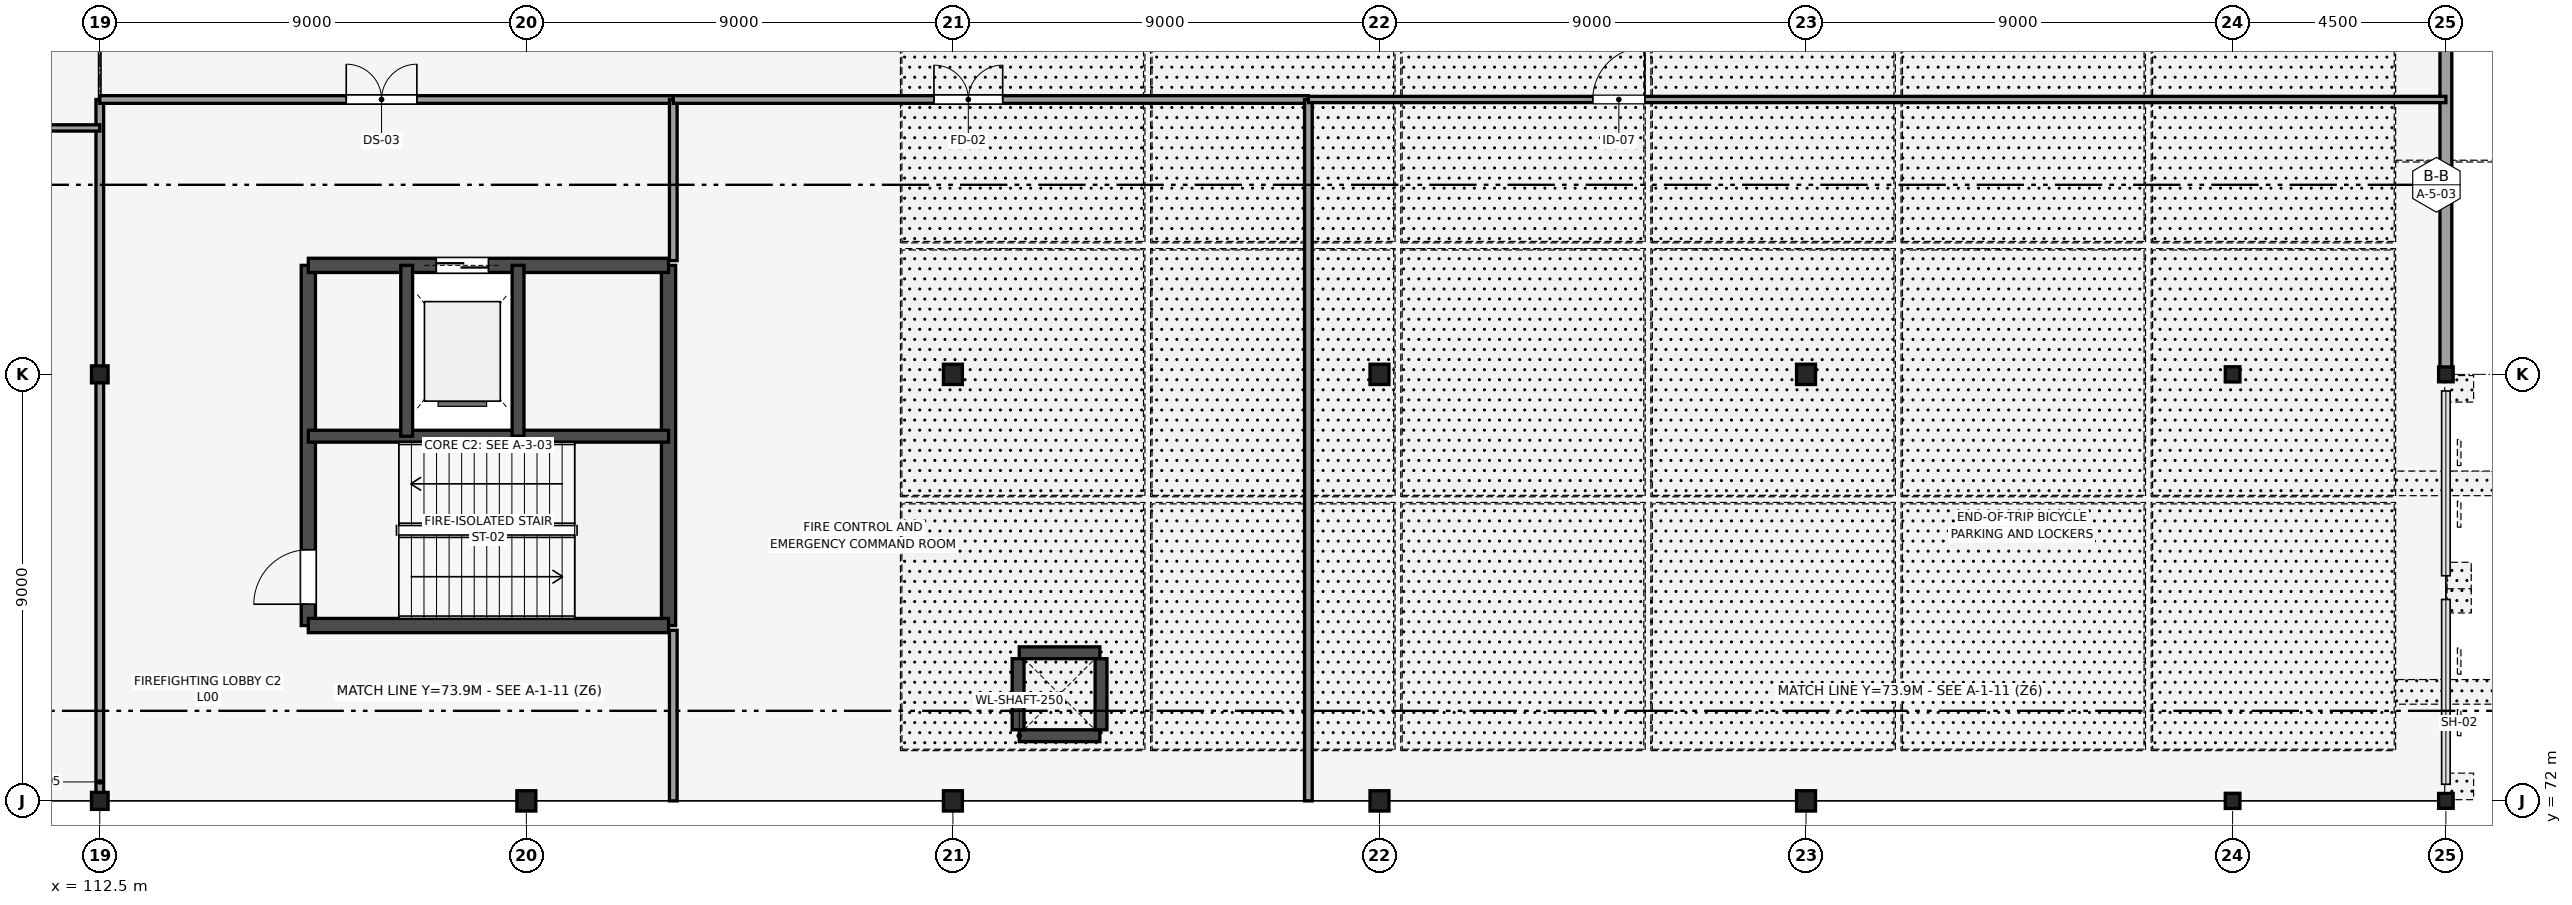
"""IFC4 building model, lengths in metres.
Left out: names, types, materials, properties, quantities, classifications, styles, units other than length and angle.
Written with IfcOpenShell. Run it as: python <this file> out.ifc"""

import sys

from ifc_helpers import new_model, si_unit, direction, frame, frame_2d, origin, origin_2d, place, context, subcontext, project, spatial, rectangle, i_section, extrude, element, fill, save


model = new_model("IFC4")
c1 = context("Model", 3, precision=1e-05, world=origin(), true_north=direction((0.0, 1.0)))
c2 = subcontext(c1, "Body", "Model", "MODEL_VIEW")
j1 = project(units=[si_unit("LENGTHUNIT", "METRE"), si_unit("PLANEANGLEUNIT", "RADIAN")], contexts=[c1])
p1 = place(None, origin())
s1 = spatial("IfcSite", under=j1, at=p1, CompositionType="ELEMENT")
p2 = place(p1, origin())
s2 = spatial("IfcBuilding", under=s1, at=p2, CompositionType="ELEMENT")
p3 = place(p2, origin())
s3 = spatial("IfcBuildingStorey", under=s2, at=p3, CompositionType="ELEMENT", Elevation=0.0)
for number, where, z_axis, x_axis in (
    (1, (112.5, 72.0, 0.0), (0.0, 0.0, 1.0), (1.0, 0.0, 0.0)),
    (2, (112.5, 81.0, 0.0), (0.0, 0.0, 1.0), (1.0, 0.0, 0.0)),
):
    element("IfcColumn", number, at=place(p3, frame(where, z_axis=z_axis, x_axis=x_axis)), inside=s3, PredefinedType="COLUMN", context=c2, shape_type="SweptSolid", body=[
        extrude(i_section(OverallWidth=0.35, OverallDepth=0.359, WebThickness=0.016, FlangeThickness=0.024, FilletRadius=0.014, at=origin_2d()), origin(), (0.0, 0.0, 1.0), 5.4),
    ])
for number, where, z_axis, x_axis in (
    (3, (121.5, 72.0, 0.0), (0.0, 0.0, 1.0), (1.0, 0.0, 0.0)),
    (4, (130.5, 72.0, 0.0), (0.0, 0.0, 1.0), (1.0, 0.0, 0.0)),
    (5, (130.5, 81.0, 0.0), (0.0, 0.0, 1.0), (1.0, 0.0, 0.0)),
    (6, (139.5, 72.0, 0.0), (0.0, 0.0, 1.0), (1.0, 0.0, 0.0)),
    (7, (139.5, 81.0, 0.0), (0.0, 0.0, 1.0), (1.0, 0.0, 0.0)),
    (8, (148.5, 72.0, 0.0), (0.0, 0.0, 1.0), (1.0, 0.0, 0.0)),
    (9, (148.5, 81.0, 0.0), (0.0, 0.0, 1.0), (1.0, 0.0, 0.0)),
):
    element("IfcColumn", number, at=place(p3, frame(where, z_axis=z_axis, x_axis=x_axis)), inside=s3, PredefinedType="COLUMN", context=c2, shape_type="SweptSolid", body=[
        extrude(i_section(OverallWidth=0.4, OverallDepth=0.428, WebThickness=0.02, FlangeThickness=0.028, FilletRadius=0.016, at=origin_2d()), origin(), (0.0, 0.0, 1.0), 5.4),
    ])
for number, where, z_axis, x_axis in (
    (10, (157.5, 72.0, 0.0), (0.0, 0.0, 1.0), (1.0, 0.0, 0.0)),
    (11, (157.5, 81.0, 0.0), (0.0, 0.0, 1.0), (1.0, 0.0, 0.0)),
):
    element("IfcColumn", number, at=place(p3, frame(where, z_axis=z_axis, x_axis=x_axis)), inside=s3, PredefinedType="COLUMN", context=c2, shape_type="SweptSolid", body=[
        extrude(i_section(OverallWidth=0.309, OverallDepth=0.321, WebThickness=0.014, FlangeThickness=0.022, FilletRadius=0.017, at=origin_2d()), origin(), (0.0, 0.0, 1.0), 5.4),
    ])
for number, where, z_axis, x_axis in (
    (12, (162.0, 72.0, 0.0), (0.0, 0.0, 1.0), (1.0, 0.0, 0.0)),
    (13, (162.0, 81.0, 0.0), (0.0, 0.0, 1.0), (1.0, 0.0, 0.0)),
):
    element("IfcColumn", number, at=place(p3, frame(where, z_axis=z_axis, x_axis=x_axis)), inside=s3, PredefinedType="COLUMN", context=c2, shape_type="SweptSolid", body=[
        extrude(i_section(OverallWidth=0.307, OverallDepth=0.315, WebThickness=0.012, FlangeThickness=0.019, FilletRadius=0.017, at=origin_2d()), origin(), (0.0, 0.0, 1.0), 5.4),
    ])
p4 = place(p3, frame((116.9, 75.7, 0.0), z_axis=(0.0, 0.0, 1.0), x_axis=(0.0, 1.0, 0.0)))
e14 = element("IfcWall", 14, at=p4, inside=s3, PredefinedType="SHEAR", context=c2, shape_type="SweptSolid", body=[
    extrude(rectangle(XDim=7.6, YDim=0.3, at=frame_2d((3.8, 0.0))), origin(), (0.0, 0.0, 1.0), 5.4),
])
p5 = place(p4, frame((0.45, 0.0, 0.0)))
e15 = element("IfcOpeningElement", 15, at=p5, cuts=e14, PredefinedType="OPENING", context=c2, shape_type="SweptSolid", body=[
    extrude(rectangle(XDim=1.15, YDim=2.15, at=frame_2d((0.575, 1.075))), frame((0.0, 0.16, 0.0), z_axis=(0.0, -1.0, 0.0), x_axis=(1.0, 0.0, 0.0)), (0.0, 0.0, 1.0), 0.32),
])
for number, where, z_axis, x_axis in (
    (16, (124.5, 75.7, 0.0), (0.0, 0.0, 1.0), (0.0, 1.0, 0.0)),
    (17, (116.9, 75.7, 0.0), (0.0, 0.0, 1.0), (1.0, 0.0, 0.0)),
):
    element("IfcWall", number, at=place(p3, frame(where, z_axis=z_axis, x_axis=x_axis)), inside=s3, PredefinedType="SHEAR", context=c2, shape_type="SweptSolid", body=[
        extrude(rectangle(XDim=7.6, YDim=0.3, at=frame_2d((3.8, 0.0))), origin(), (0.0, 0.0, 1.0), 5.4),
    ])
p6 = place(p3, frame((116.9, 83.3, 0.0), z_axis=(0.0, 0.0, 1.0), x_axis=(1.0, 0.0, 0.0)))
e18 = element("IfcWall", 18, at=p6, inside=s3, PredefinedType="SHEAR", context=c2, shape_type="SweptSolid", body=[
    extrude(rectangle(XDim=7.6, YDim=0.3, at=frame_2d((3.8, 0.0))), origin(), (0.0, 0.0, 1.0), 5.4),
])
p7 = place(p6, frame((2.7, 0.0, 0.0)))
e19 = element("IfcOpeningElement", 19, at=p7, cuts=e18, PredefinedType="OPENING", context=c2, shape_type="SweptSolid", body=[
    extrude(rectangle(XDim=1.1, YDim=2.2, at=frame_2d((0.55, 1.1))), frame((0.0, 0.16, 0.0), z_axis=(0.0, -1.0, 0.0), x_axis=(1.0, 0.0, 0.0)), (0.0, 0.0, 1.0), 0.32),
])
p8 = place(p3, frame((116.9, 79.695, 0.0), z_axis=(0.0, 0.0, 1.0), x_axis=(1.0, 0.0, 0.0)))
e20 = element("IfcWall", 20, at=p8, inside=s3, PredefinedType="SHEAR", context=c2, shape_type="SweptSolid", body=[
    extrude(rectangle(XDim=7.6, YDim=0.25, at=frame_2d((3.8, 0.0))), origin(), (0.0, 0.0, 1.0), 5.4),
])
for number, where, z_axis, x_axis in (
    (21, (118.975, 79.695, 0.0), (0.0, 0.0, 1.0), (0.0, 1.0, 0.0)),
    (22, (121.325, 79.695, 0.0), (0.0, 0.0, 1.0), (0.0, 1.0, 0.0)),
):
    element("IfcWall", number, at=place(p3, frame(where, z_axis=z_axis, x_axis=x_axis)), inside=s3, PredefinedType="SHEAR", context=c2, shape_type="SweptSolid", body=[
        extrude(rectangle(XDim=3.605, YDim=0.25, at=frame_2d((1.802, 0.0))), origin(), (0.0, 0.0, 1.0), 5.4),
    ])
for number, where, z_axis, x_axis in (
    (23, (131.9, 73.375, 0.0), (0.0, 0.0, 1.0), (1.0, 0.0, 0.0)),
    (24, (131.9, 75.125, 0.0), (0.0, 0.0, 1.0), (1.0, 0.0, 0.0)),
):
    element("IfcWall", number, at=place(p3, frame(where, z_axis=z_axis, x_axis=x_axis)), inside=s3, PredefinedType="SHEAR", context=c2, shape_type="SweptSolid", body=[
        extrude(rectangle(XDim=1.7, YDim=0.25, at=frame_2d((0.85, 0.0))), origin(), (0.0, 0.0, 1.0), 4.67),
    ])
for number, where, z_axis, x_axis in (
    (25, (131.875, 73.5, 0.0), (0.0, 0.0, 1.0), (0.0, 1.0, 0.0)),
    (26, (133.625, 73.5, 0.0), (0.0, 0.0, 1.0), (0.0, 1.0, 0.0)),
):
    element("IfcWall", number, at=place(p3, frame(where, z_axis=z_axis, x_axis=x_axis)), inside=s3, PredefinedType="SHEAR", context=c2, shape_type="SweptSolid", body=[
        extrude(rectangle(XDim=1.5, YDim=0.25, at=frame_2d((0.75, 0.0))), origin(), (0.0, 0.0, 1.0), 4.67),
    ])
p9 = place(p3, frame((108.0, 72.0, 0.0), z_axis=(0.0, 0.0, 1.0), x_axis=(1.0, 0.0, 0.0)))
e27 = element("IfcWall", 27, at=p9, inside=s3, PredefinedType="STANDARD", context=c2, shape_type="SweptSolid", body=[
    extrude(rectangle(XDim=4.5, YDim=0.25, at=frame_2d((2.25, 0.0))), origin(), (0.0, 0.0, 1.0), 4.746),
])
p10 = place(p3, frame((112.5, 72.0, 0.0), z_axis=(0.0, 0.0, 1.0), x_axis=(1.0, 0.0, 0.0)))
e28 = element("IfcWall", 28, at=p10, inside=s3, PredefinedType="STANDARD", context=c2, shape_type="SweptSolid", body=[
    extrude(rectangle(XDim=9.0, YDim=0.25, at=frame_2d((4.5, 0.0))), origin(), (0.0, 0.0, 1.0), 4.746),
])
p11 = place(p10, frame((1.25, 0.0, 0.0)))
e29 = element("IfcOpeningElement", 29, at=p11, cuts=e28, PredefinedType="OPENING", context=c2, shape_type="SweptSolid", body=[
    extrude(rectangle(XDim=1.85, YDim=2.2, at=frame_2d((0.925, 1.1))), frame((0.0, 0.135, 0.0), z_axis=(0.0, -1.0, 0.0), x_axis=(1.0, 0.0, 0.0)), (0.0, 0.0, 1.0), 0.27),
])
p12 = place(p3, frame((157.5, 72.0, 0.0), z_axis=(0.0, 0.0, 1.0), x_axis=(1.0, 0.0, 0.0)))
e30 = element("IfcWall", 30, at=p12, inside=s3, PredefinedType="STANDARD", context=c2, shape_type="SweptSolid", body=[
    extrude(rectangle(XDim=4.5, YDim=0.23, at=frame_2d((2.25, 0.0))), origin(), (0.0, 0.0, 1.0), 4.746),
])
p13 = place(p12, frame((1.35, 0.0, 0.9)))
e31 = element("IfcOpeningElement", 31, at=p13, cuts=e30, PredefinedType="OPENING", context=c2, shape_type="SweptSolid", body=[
    extrude(rectangle(XDim=1.8, YDim=2.1, at=frame_2d((0.9, 1.05))), frame((0.0, 0.125, 0.0), z_axis=(0.0, -1.0, 0.0), x_axis=(1.0, 0.0, 0.0)), (0.0, 0.0, 1.0), 0.25),
])
p14 = place(p3, frame((162.0, 81.0, 0.0), z_axis=(0.0, 0.0, 1.0), x_axis=(0.0, 1.0, 0.0)))
e32 = element("IfcWall", 32, at=p14, inside=s3, PredefinedType="STANDARD", context=c2, shape_type="SweptSolid", body=[
    extrude(rectangle(XDim=9.0, YDim=0.25, at=frame_2d((4.5, 0.0))), origin(), (0.0, 0.0, 1.0), 4.746),
])
p15 = place(p3, frame((112.5, 72.0, 0.0), z_axis=(0.0, 0.0, 1.0), x_axis=(0.0, 1.0, 0.0)))
e33 = element("IfcWall", 33, at=p15, inside=s3, PredefinedType="PARTITIONING", context=c2, shape_type="SweptSolid", body=[
    extrude(rectangle(XDim=14.8, YDim=0.162, at=frame_2d((7.4, 0.0))), origin(), (0.0, 0.0, 1.0), 4.746),
])
p16 = place(p3, frame((112.5, 86.8, 0.0), z_axis=(0.0, 0.0, 1.0), x_axis=(1.0, 0.0, 0.0)))
e34 = element("IfcWall", 34, at=p16, inside=s3, PredefinedType="PARTITIONING", context=c2, shape_type="SweptSolid", body=[
    extrude(rectangle(XDim=12.1, YDim=0.162, at=frame_2d((6.05, 0.0))), origin(), (0.0, 0.0, 1.0), 5.22),
])
p17 = place(p16, frame((5.2, 0.0, 0.0)))
e35 = element("IfcOpeningElement", 35, at=p17, cuts=e34, PredefinedType="OPENING", context=c2, shape_type="SweptSolid", body=[
    extrude(rectangle(XDim=1.49, YDim=2.15, at=frame_2d((0.745, 1.075))), frame((0.0, 0.091, 0.0), z_axis=(0.0, -1.0, 0.0), x_axis=(1.0, 0.0, 0.0)), (0.0, 0.0, 1.0), 0.182),
])
p18 = place(p3, frame((124.6, 83.4, 0.0), z_axis=(0.0, 0.0, 1.0), x_axis=(0.0, 1.0, 0.0)))
e36 = element("IfcWall", 36, at=p18, inside=s3, PredefinedType="PARTITIONING", context=c2, shape_type="SweptSolid", body=[
    extrude(rectangle(XDim=3.4, YDim=0.162, at=frame_2d((1.7, 0.0))), origin(), (0.0, 0.0, 1.0), 5.22),
])
p19 = place(p3, frame((124.6, 72.0, 0.0), z_axis=(0.0, 0.0, 1.0), x_axis=(0.0, 1.0, 0.0)))
e37 = element("IfcWall", 37, at=p19, inside=s3, PredefinedType="PARTITIONING", context=c2, shape_type="SweptSolid", body=[
    extrude(rectangle(XDim=3.6, YDim=0.162, at=frame_2d((1.8, 0.0))), origin(), (0.0, 0.0, 1.0), 5.22),
])
p20 = place(p3, frame((93.0, 86.2, 0.0), z_axis=(0.0, 0.0, 1.0), x_axis=(1.0, 0.0, 0.0)))
e38 = element("IfcWall", 38, at=p20, inside=s3, PredefinedType="PARTITIONING", context=c2, shape_type="SweptSolid", body=[
    extrude(rectangle(XDim=19.5, YDim=0.132, at=frame_2d((9.75, 0.0))), origin(), (0.0, 0.0, 1.0), 5.22),
])
p21 = place(p20, frame((5.5, 0.0, 0.0)))
e39 = element("IfcOpeningElement", 39, at=p21, cuts=e38, PredefinedType="OPENING", context=c2, shape_type="SweptSolid", body=[
    extrude(rectangle(XDim=0.95, YDim=2.15, at=frame_2d((0.475, 1.075))), frame((0.0, 0.076, 0.0), z_axis=(0.0, -1.0, 0.0), x_axis=(1.0, 0.0, 0.0)), (0.0, 0.0, 1.0), 0.152),
])
p22 = place(p3, frame((124.6, 86.8, 0.0), z_axis=(0.0, 0.0, 1.0), x_axis=(1.0, 0.0, 0.0)))
e40 = element("IfcWall", 40, at=p22, inside=s3, PredefinedType="PARTITIONING", context=c2, shape_type="SweptSolid", body=[
    extrude(rectangle(XDim=13.4, YDim=0.162, at=frame_2d((6.7, 0.0))), origin(), (0.0, 0.0, 1.0), 5.22),
])
p23 = place(p22, frame((5.5, 0.0, 0.0)))
e41 = element("IfcOpeningElement", 41, at=p23, cuts=e40, PredefinedType="OPENING", context=c2, shape_type="SweptSolid", body=[
    extrude(rectangle(XDim=1.45, YDim=2.2, at=frame_2d((0.725, 1.1))), frame((0.0, 0.091, 0.0), z_axis=(0.0, -1.0, 0.0), x_axis=(1.0, 0.0, 0.0)), (0.0, 0.0, 1.0), 0.182),
])
p24 = place(p3, frame((138.0, 72.0, 0.0), z_axis=(0.0, 0.0, 1.0), x_axis=(0.0, 1.0, 0.0)))
e42 = element("IfcWall", 42, at=p24, inside=s3, PredefinedType="PARTITIONING", context=c2, shape_type="SweptSolid", body=[
    extrude(rectangle(XDim=14.8, YDim=0.162, at=frame_2d((7.4, 0.0))), origin(), (0.0, 0.0, 1.0), 5.22),
])
p25 = place(p3, frame((138.0, 86.8, 0.0), z_axis=(0.0, 0.0, 1.0), x_axis=(1.0, 0.0, 0.0)))
e43 = element("IfcWall", 43, at=p25, inside=s3, PredefinedType="PARTITIONING", context=c2, shape_type="SweptSolid", body=[
    extrude(rectangle(XDim=24.0, YDim=0.132, at=frame_2d((12.0, 0.0))), origin(), (0.0, 0.0, 1.0), 5.22),
])
p26 = place(p25, frame((6.0, 0.0, 0.0)))
e44 = element("IfcOpeningElement", 44, at=p26, cuts=e43, PredefinedType="OPENING", context=c2, shape_type="SweptSolid", body=[
    extrude(rectangle(XDim=1.1, YDim=2.15, at=frame_2d((0.55, 1.075))), frame((0.0, 0.076, 0.0), z_axis=(0.0, -1.0, 0.0), x_axis=(1.0, 0.0, 0.0)), (0.0, 0.0, 1.0), 0.152),
])
p27 = place(p11, origin())
e45 = element("IfcDoor", 45, at=p27, inside=s3, OperationType="DOUBLE_DOOR_SINGLE_SWING", PredefinedType="DOOR", context=c2, shape_type="SweptSolid", body=[
    extrude(rectangle(XDim=1.85, YDim=2.2, at=frame_2d((0.925, 1.1))), frame((0.0, 0.025, 0.0), z_axis=(0.0, -1.0, 0.0), x_axis=(1.0, 0.0, 0.0)), (0.0, 0.0, 1.0), 0.05),
])
fill(e29, e45)
p28 = place(p13, origin())
e46 = element("IfcWindow", 46, at=p28, inside=s3, PartitioningType="SINGLE_PANEL", PredefinedType="WINDOW", context=c2, shape_type="SweptSolid", body=[
    extrude(rectangle(XDim=1.8, YDim=2.1, at=frame_2d((0.9, 1.05))), frame((0.0, 0.03, 0.0), z_axis=(0.0, -1.0, 0.0), x_axis=(1.0, 0.0, 0.0)), (0.0, 0.0, 1.0), 0.06),
])
fill(e31, e46)
p29 = place(p5, origin())
e47 = element("IfcDoor", 47, at=p29, inside=s3, OperationType="SINGLE_SWING_LEFT", PredefinedType="DOOR", context=c2, shape_type="SweptSolid", body=[
    extrude(rectangle(XDim=1.15, YDim=2.15, at=frame_2d((0.575, 1.075))), frame((0.0, 0.025, 0.0), z_axis=(0.0, -1.0, 0.0), x_axis=(1.0, 0.0, 0.0)), (0.0, 0.0, 1.0), 0.05),
])
fill(e15, e47)
p30 = place(p7, origin())
e48 = element("IfcDoor", 48, at=p30, inside=s3, OperationType="DOUBLE_DOOR_SLIDING", PredefinedType="DOOR", context=c2, shape_type="SweptSolid", body=[
    extrude(rectangle(XDim=1.1, YDim=2.2, at=frame_2d((0.55, 1.1))), frame((0.0, 0.025, 0.0), z_axis=(0.0, -1.0, 0.0), x_axis=(1.0, 0.0, 0.0)), (0.0, 0.0, 1.0), 0.05),
])
fill(e19, e48)
p31 = place(p17, origin())
e49 = element("IfcDoor", 49, at=p31, inside=s3, OperationType="DOUBLE_DOOR_SINGLE_SWING", PredefinedType="DOOR", context=c2, shape_type="SweptSolid", body=[
    extrude(rectangle(XDim=1.49, YDim=2.15, at=frame_2d((0.745, 1.075))), frame((0.0, 0.025, 0.0), z_axis=(0.0, -1.0, 0.0), x_axis=(1.0, 0.0, 0.0)), (0.0, 0.0, 1.0), 0.05),
])
fill(e35, e49)
p32 = place(p23, origin())
e50 = element("IfcDoor", 50, at=p32, inside=s3, OperationType="DOUBLE_DOOR_SINGLE_SWING", PredefinedType="DOOR", context=c2, shape_type="SweptSolid", body=[
    extrude(rectangle(XDim=1.45, YDim=2.2, at=frame_2d((0.725, 1.1))), frame((0.0, 0.025, 0.0), z_axis=(0.0, -1.0, 0.0), x_axis=(1.0, 0.0, 0.0)), (0.0, 0.0, 1.0), 0.05),
])
fill(e41, e50)
p33 = place(p26, origin())
e51 = element("IfcDoor", 51, at=p33, inside=s3, OperationType="SINGLE_SWING_RIGHT", PredefinedType="DOOR", context=c2, shape_type="SweptSolid", body=[
    extrude(rectangle(XDim=1.1, YDim=2.15, at=frame_2d((0.55, 1.075))), frame((0.0, 0.025, 0.0), z_axis=(0.0, -1.0, 0.0), x_axis=(1.0, 0.0, 0.0)), (0.0, 0.0, 1.0), 0.05),
])
fill(e44, e51)
save(model, sys.argv[1])
